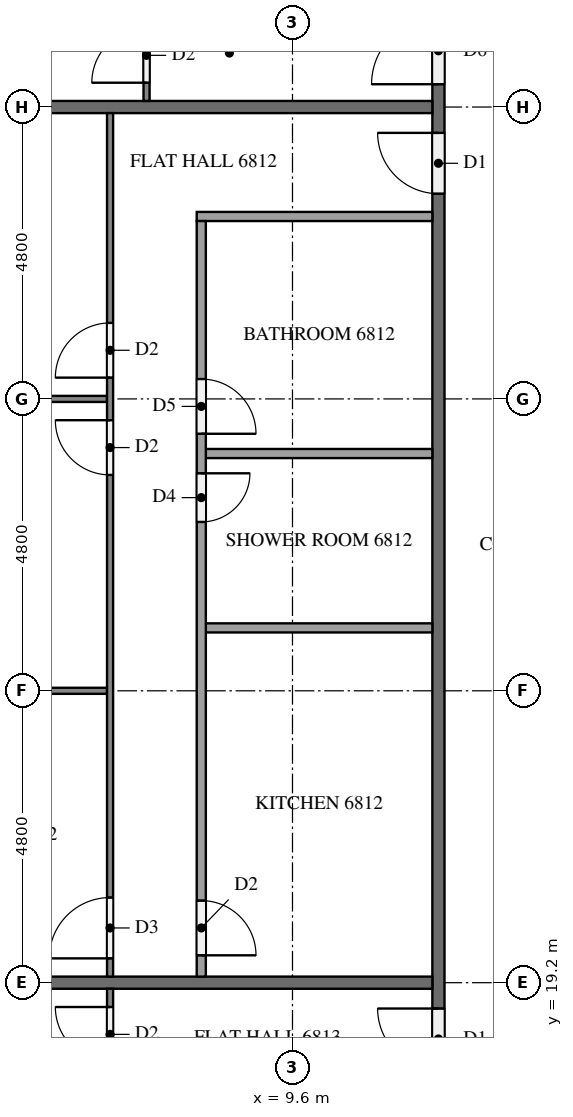
"""IFC4 building model, lengths in metres.
Left out: names, types, materials, properties, quantities, classifications, styles, units other than length and angle.
Written with IfcOpenShell. Run it as: python <this file> out.ifc"""

import sys

from ifc_helpers import new_model, si_unit, direction, frame, frame_2d, origin, place, context, subcontext, project, spatial, rectangle, extrude, element, fill, save


model = new_model("IFC4")
c1 = context("Model", 3, precision=1e-05, world=origin(), true_north=direction((0.0, 1.0)))
c2 = subcontext(c1, "Body", "Model", "MODEL_VIEW")
j1 = project(units=[si_unit("LENGTHUNIT", "METRE"), si_unit("PLANEANGLEUNIT", "RADIAN")], contexts=[c1])
p1 = place(None, origin())
s1 = spatial("IfcSite", under=j1, at=p1, CompositionType="ELEMENT")
p2 = place(p1, origin())
s2 = spatial("IfcBuilding", under=s1, at=p2, CompositionType="ELEMENT")
p3 = place(p2, frame((0.0, 0.0, 259.7)))
s3 = spatial("IfcBuildingStorey", under=s2, at=p3, CompositionType="ELEMENT", Elevation=259.7)
p4 = place(p3, frame((12.0, 12.1, 0.0), z_axis=(0.0, 0.0, 1.0), x_axis=(0.0, 1.0, 0.0)))
e1 = element("IfcWall", 1, at=p4, inside=s3, PredefinedType="PARTITIONING", context=c2, shape_type="SweptSolid", body=[
    extrude(rectangle(XDim=28.6, YDim=0.2, at=frame_2d((14.3, 0.0))), origin(), (0.0, 0.0, 1.0), 3.1),
])
p5 = place(p4, frame((21.875, 0.0, 0.0)))
e2 = element("IfcOpeningElement", 2, at=p5, cuts=e1, PredefinedType="OPENING", context=c2, shape_type="SweptSolid", body=[
    extrude(rectangle(XDim=1.1, YDim=2.1, at=frame_2d((0.55, 1.05))), frame((0.0, 0.11, 0.0), z_axis=(0.0, -1.0, 0.0), x_axis=(1.0, 0.0, 0.0)), (0.0, 0.0, 1.0), 0.22),
])
p6 = place(p4, frame((20.075, 0.0, 0.0)))
e3 = element("IfcOpeningElement", 3, at=p6, cuts=e1, PredefinedType="OPENING", context=c2, shape_type="SweptSolid", body=[
    extrude(rectangle(XDim=1.0, YDim=2.1, at=frame_2d((0.5, 1.05))), frame((0.0, 0.11, 0.0), z_axis=(0.0, -1.0, 0.0), x_axis=(1.0, 0.0, 0.0)), (0.0, 0.0, 1.0), 0.22),
])
p7 = place(p4, frame((5.675, 0.0, 0.0)))
e4 = element("IfcOpeningElement", 4, at=p7, cuts=e1, PredefinedType="OPENING", context=c2, shape_type="SweptSolid", body=[
    extrude(rectangle(XDim=1.0, YDim=2.1, at=frame_2d((0.5, 1.05))), frame((0.0, 0.11, 0.0), z_axis=(0.0, -1.0, 0.0), x_axis=(1.0, 0.0, 0.0)), (0.0, 0.0, 1.0), 0.22),
])
p8 = place(p3, frame((0.1, 33.6, 0.0), z_axis=(0.0, 0.0, 1.0), x_axis=(1.0, 0.0, 0.0)))
e5 = element("IfcWall", 5, at=p8, inside=s3, PredefinedType="PARTITIONING", context=c2, shape_type="SweptSolid", body=[
    extrude(rectangle(XDim=11.8, YDim=0.2, at=frame_2d((5.9, 0.0))), origin(), (0.0, 0.0, 1.0), 3.1),
])
p9 = place(p3, frame((0.275, 19.2, 0.0), z_axis=(0.0, 0.0, 1.0), x_axis=(1.0, 0.0, 0.0)))
e6 = element("IfcWall", 6, at=p9, inside=s3, PredefinedType="PARTITIONING", context=c2, shape_type="SweptSolid", body=[
    extrude(rectangle(XDim=11.625, YDim=0.2, at=frame_2d((5.812, 0.0))), origin(), (0.0, 0.0, 1.0), 3.1),
])
p10 = place(p3, frame((7.2, 33.7, 0.0), z_axis=(0.0, 0.0, 1.0), x_axis=(0.0, 1.0, 0.0)))
e7 = element("IfcWall", 7, at=p10, inside=s3, PredefinedType="PARTITIONING", context=c2, shape_type="SweptSolid", body=[
    extrude(rectangle(XDim=19.0, YDim=0.1, at=frame_2d((9.5, 0.0))), origin(), (0.0, 0.0, 1.0), 3.1),
])
p11 = place(p10, frame((0.3, 0.0, 0.0)))
e8 = element("IfcOpeningElement", 8, at=p11, cuts=e7, PredefinedType="OPENING", context=c2, shape_type="SweptSolid", body=[
    extrude(rectangle(XDim=0.9, YDim=2.1, at=frame_2d((0.45, 1.05))), frame((0.0, 0.06, 0.0), z_axis=(0.0, -1.0, 0.0), x_axis=(1.0, 0.0, 0.0)), (0.0, 0.0, 1.0), 0.12),
])
p12 = place(p10, frame((8.25, 0.0, 0.0)))
e9 = element("IfcOpeningElement", 9, at=p12, cuts=e7, PredefinedType="OPENING", context=c2, shape_type="SweptSolid", body=[
    extrude(rectangle(XDim=0.9, YDim=2.1, at=frame_2d((0.45, 1.05))), frame((0.0, 0.06, 0.0), z_axis=(0.0, -1.0, 0.0), x_axis=(1.0, 0.0, 0.0)), (0.0, 0.0, 1.0), 0.12),
])
p13 = place(p10, frame((9.85, 0.0, 0.0)))
e10 = element("IfcOpeningElement", 10, at=p13, cuts=e7, PredefinedType="OPENING", context=c2, shape_type="SweptSolid", body=[
    extrude(rectangle(XDim=1.0, YDim=2.1, at=frame_2d((0.5, 1.05))), frame((0.0, 0.06, 0.0), z_axis=(0.0, -1.0, 0.0), x_axis=(1.0, 0.0, 0.0)), (0.0, 0.0, 1.0), 0.12),
])
p14 = place(p10, frame((17.8, 0.0, 0.0)))
e11 = element("IfcOpeningElement", 11, at=p14, cuts=e7, PredefinedType="OPENING", context=c2, shape_type="SweptSolid", body=[
    extrude(rectangle(XDim=0.9, YDim=2.1, at=frame_2d((0.45, 1.05))), frame((0.0, 0.06, 0.0), z_axis=(0.0, -1.0, 0.0), x_axis=(1.0, 0.0, 0.0)), (0.0, 0.0, 1.0), 0.12),
])
p15 = place(p3, frame((6.55, 28.8, 0.0), z_axis=(0.0, 0.0, 1.0), x_axis=(-1.0, 0.0, 0.0)))
e12 = element("IfcWall", 12, at=p15, inside=s3, PredefinedType="PARTITIONING", context=c2, shape_type="SweptSolid", body=[
    extrude(rectangle(XDim=6.275, YDim=0.1, at=frame_2d((3.138, 0.0))), origin(), (0.0, 0.0, 1.0), 3.1),
])
p16 = place(p3, frame((6.55, 24.0, 0.0), z_axis=(0.0, 0.0, 1.0), x_axis=(-1.0, 0.0, 0.0)))
e13 = element("IfcWall", 13, at=p16, inside=s3, PredefinedType="PARTITIONING", context=c2, shape_type="SweptSolid", body=[
    extrude(rectangle(XDim=6.45, YDim=0.1, at=frame_2d((3.225, 0.0))), origin(), (0.0, 0.0, 1.0), 3.1),
])
p17 = place(p3, frame((6.6, 19.3, 0.0), z_axis=(0.0, 0.0, 1.0), x_axis=(0.0, 1.0, 0.0)))
e14 = element("IfcWall", 14, at=p17, inside=s3, PredefinedType="PARTITIONING", context=c2, shape_type="SweptSolid", body=[
    extrude(rectangle(XDim=14.2, YDim=0.1, at=frame_2d((7.1, 0.0))), origin(), (0.0, 0.0, 1.0), 3.1),
])
p18 = place(p17, frame((9.85, 0.0, 0.0)))
e15 = element("IfcOpeningElement", 15, at=p18, cuts=e14, PredefinedType="OPENING", context=c2, shape_type="SweptSolid", body=[
    extrude(rectangle(XDim=0.9, YDim=2.1, at=frame_2d((0.45, 1.05))), frame((0.0, 0.06, 0.0), z_axis=(0.0, -1.0, 0.0), x_axis=(1.0, 0.0, 0.0)), (0.0, 0.0, 1.0), 0.12),
])
p19 = place(p17, frame((8.25, 0.0, 0.0)))
e16 = element("IfcOpeningElement", 16, at=p19, cuts=e14, PredefinedType="OPENING", context=c2, shape_type="SweptSolid", body=[
    extrude(rectangle(XDim=0.9, YDim=2.1, at=frame_2d((0.45, 1.05))), frame((0.0, 0.06, 0.0), z_axis=(0.0, -1.0, 0.0), x_axis=(1.0, 0.0, 0.0)), (0.0, 0.0, 1.0), 0.12),
])
p20 = place(p17, frame((0.3, 0.0, 0.0)))
e17 = element("IfcOpeningElement", 17, at=p20, cuts=e14, PredefinedType="OPENING", context=c2, shape_type="SweptSolid", body=[
    extrude(rectangle(XDim=1.0, YDim=2.1, at=frame_2d((0.5, 1.05))), frame((0.0, 0.06, 0.0), z_axis=(0.0, -1.0, 0.0), x_axis=(1.0, 0.0, 0.0)), (0.0, 0.0, 1.0), 0.12),
])
for number, where, z_axis, x_axis in (
    (18, (11.9, 27.902, 0.0), (0.0, 0.0, 1.0), (-1.0, 0.0, 0.0)),
    (19, (11.9, 25.035, 0.0), (0.0, 0.0, 1.0), (-1.0, 0.0, 0.0)),
):
    element("IfcWall", number, at=place(p3, frame(where, z_axis=z_axis, x_axis=x_axis)), inside=s3, PredefinedType="PARTITIONING", context=c2, shape_type="SweptSolid", body=[
        extrude(rectangle(XDim=3.725, YDim=0.15, at=frame_2d((1.862, 0.0))), origin(), (0.0, 0.0, 1.0), 3.1),
    ])
p21 = place(p3, frame((11.9, 31.8, 0.0), z_axis=(0.0, 0.0, 1.0), x_axis=(-1.0, 0.0, 0.0)))
e20 = element("IfcWall", 20, at=p21, inside=s3, PredefinedType="PARTITIONING", context=c2, shape_type="SweptSolid", body=[
    extrude(rectangle(XDim=3.875, YDim=0.15, at=frame_2d((1.938, 0.0))), origin(), (0.0, 0.0, 1.0), 3.1),
])
p22 = place(p3, frame((8.1, 31.725, 0.0), z_axis=(0.0, 0.0, 1.0), x_axis=(0.0, -1.0, 0.0)))
e21 = element("IfcWall", 21, at=p22, inside=s3, PredefinedType="PARTITIONING", context=c2, shape_type="SweptSolid", body=[
    extrude(rectangle(XDim=12.425, YDim=0.15, at=frame_2d((6.212, 0.0))), origin(), (0.0, 0.0, 1.0), 3.1),
])
p23 = place(p22, frame((2.598, 0.0, 0.0)))
e22 = element("IfcOpeningElement", 22, at=p23, cuts=e21, PredefinedType="OPENING", context=c2, shape_type="SweptSolid", body=[
    extrude(rectangle(XDim=0.9, YDim=2.1, at=frame_2d((0.45, 1.05))), frame((0.0, 0.085, 0.0), z_axis=(0.0, -1.0, 0.0), x_axis=(1.0, 0.0, 0.0)), (0.0, 0.0, 1.0), 0.17),
])
p24 = place(p22, frame((4.148, 0.0, 0.0)))
e23 = element("IfcOpeningElement", 23, at=p24, cuts=e21, PredefinedType="OPENING", context=c2, shape_type="SweptSolid", body=[
    extrude(rectangle(XDim=0.8, YDim=2.1, at=frame_2d((0.4, 1.05))), frame((0.0, 0.085, 0.0), z_axis=(0.0, -1.0, 0.0), x_axis=(1.0, 0.0, 0.0)), (0.0, 0.0, 1.0), 0.17),
])
p25 = place(p22, frame((11.175, 0.0, 0.0)))
e24 = element("IfcOpeningElement", 24, at=p25, cuts=e21, PredefinedType="OPENING", context=c2, shape_type="SweptSolid", body=[
    extrude(rectangle(XDim=0.9, YDim=2.1, at=frame_2d((0.45, 1.05))), frame((0.0, 0.085, 0.0), z_axis=(0.0, -1.0, 0.0), x_axis=(1.0, 0.0, 0.0)), (0.0, 0.0, 1.0), 0.17),
])
p26 = place(p3, frame((6.6, 4.9, 0.0), z_axis=(0.0, 0.0, 1.0), x_axis=(0.0, 1.0, 0.0)))
e25 = element("IfcWall", 25, at=p26, inside=s3, PredefinedType="PARTITIONING", context=c2, shape_type="SweptSolid", body=[
    extrude(rectangle(XDim=14.2, YDim=0.1, at=frame_2d((7.1, 0.0))), origin(), (0.0, 0.0, 1.0), 3.1),
])
p27 = place(p26, frame((13.0, 0.0, 0.0)))
e26 = element("IfcOpeningElement", 26, at=p27, cuts=e25, PredefinedType="OPENING", context=c2, shape_type="SweptSolid", body=[
    extrude(rectangle(XDim=0.9, YDim=2.1, at=frame_2d((0.45, 1.05))), frame((0.0, 0.06, 0.0), z_axis=(0.0, -1.0, 0.0), x_axis=(1.0, 0.0, 0.0)), (0.0, 0.0, 1.0), 0.12),
])
p28 = place(p26, frame((5.05, 0.0, 0.0)))
e27 = element("IfcOpeningElement", 27, at=p28, cuts=e25, PredefinedType="OPENING", context=c2, shape_type="SweptSolid", body=[
    extrude(rectangle(XDim=1.0, YDim=2.1, at=frame_2d((0.5, 1.05))), frame((0.0, 0.06, 0.0), z_axis=(0.0, -1.0, 0.0), x_axis=(1.0, 0.0, 0.0)), (0.0, 0.0, 1.0), 0.12),
])
p29 = place(p26, frame((3.45, 0.0, 0.0)))
e28 = element("IfcOpeningElement", 28, at=p29, cuts=e25, PredefinedType="OPENING", context=c2, shape_type="SweptSolid", body=[
    extrude(rectangle(XDim=0.9, YDim=2.1, at=frame_2d((0.45, 1.05))), frame((0.0, 0.06, 0.0), z_axis=(0.0, -1.0, 0.0), x_axis=(1.0, 0.0, 0.0)), (0.0, 0.0, 1.0), 0.12),
])
p30 = place(p5, origin())
e29 = element("IfcDoor", 29, at=p30, inside=s3, OperationType="SINGLE_SWING_LEFT", PredefinedType="DOOR", context=c2, shape_type="SweptSolid", body=[
    extrude(rectangle(XDim=1.1, YDim=2.1, at=frame_2d((0.55, 1.05))), frame((0.0, 0.025, 0.0), z_axis=(0.0, -1.0, 0.0), x_axis=(1.0, 0.0, 0.0)), (0.0, 0.0, 1.0), 0.05),
])
fill(e2, e29)
p31 = place(p6, origin())
e30 = element("IfcDoor", 30, at=p31, inside=s3, OperationType="SINGLE_SWING_RIGHT", PredefinedType="DOOR", context=c2, shape_type="SweptSolid", body=[
    extrude(rectangle(XDim=1.0, YDim=2.1, at=frame_2d((0.5, 1.05))), frame((0.0, 0.025, 0.0), z_axis=(0.0, -1.0, 0.0), x_axis=(1.0, 0.0, 0.0)), (0.0, 0.0, 1.0), 0.05),
])
fill(e3, e30)
p32 = place(p7, origin())
e31 = element("IfcDoor", 31, at=p32, inside=s3, OperationType="SINGLE_SWING_RIGHT", PredefinedType="DOOR", context=c2, shape_type="SweptSolid", body=[
    extrude(rectangle(XDim=1.0, YDim=2.1, at=frame_2d((0.5, 1.05))), frame((0.0, 0.025, 0.0), z_axis=(0.0, -1.0, 0.0), x_axis=(1.0, 0.0, 0.0)), (0.0, 0.0, 1.0), 0.05),
])
fill(e4, e31)
p33 = place(p11, origin())
e32 = element("IfcDoor", 32, at=p33, inside=s3, OperationType="SINGLE_SWING_LEFT", PredefinedType="DOOR", context=c2, shape_type="SweptSolid", body=[
    extrude(rectangle(XDim=0.9, YDim=2.1, at=frame_2d((0.45, 1.05))), frame((0.0, 0.025, 0.0), z_axis=(0.0, -1.0, 0.0), x_axis=(1.0, 0.0, 0.0)), (0.0, 0.0, 1.0), 0.05),
])
fill(e8, e32)
p34 = place(p18, origin())
e33 = element("IfcDoor", 33, at=p34, inside=s3, OperationType="SINGLE_SWING_LEFT", PredefinedType="DOOR", context=c2, shape_type="SweptSolid", body=[
    extrude(rectangle(XDim=0.9, YDim=2.1, at=frame_2d((0.45, 1.05))), frame((0.0, 0.025, 0.0), z_axis=(0.0, -1.0, 0.0), x_axis=(1.0, 0.0, 0.0)), (0.0, 0.0, 1.0), 0.05),
])
fill(e15, e33)
p35 = place(p19, origin())
e34 = element("IfcDoor", 34, at=p35, inside=s3, OperationType="SINGLE_SWING_RIGHT", PredefinedType="DOOR", context=c2, shape_type="SweptSolid", body=[
    extrude(rectangle(XDim=0.9, YDim=2.1, at=frame_2d((0.45, 1.05))), frame((0.0, 0.025, 0.0), z_axis=(0.0, -1.0, 0.0), x_axis=(1.0, 0.0, 0.0)), (0.0, 0.0, 1.0), 0.05),
])
fill(e16, e34)
p36 = place(p20, origin())
e35 = element("IfcDoor", 35, at=p36, inside=s3, OperationType="SINGLE_SWING_LEFT", PredefinedType="DOOR", context=c2, shape_type="SweptSolid", body=[
    extrude(rectangle(XDim=1.0, YDim=2.1, at=frame_2d((0.5, 1.05))), frame((0.0, 0.025, 0.0), z_axis=(0.0, -1.0, 0.0), x_axis=(1.0, 0.0, 0.0)), (0.0, 0.0, 1.0), 0.05),
])
fill(e17, e35)
p37 = place(p23, origin())
e36 = element("IfcDoor", 36, at=p37, inside=s3, OperationType="SINGLE_SWING_RIGHT", PredefinedType="DOOR", context=c2, shape_type="SweptSolid", body=[
    extrude(rectangle(XDim=0.9, YDim=2.1, at=frame_2d((0.45, 1.05))), frame((0.0, 0.025, 0.0), z_axis=(0.0, -1.0, 0.0), x_axis=(1.0, 0.0, 0.0)), (0.0, 0.0, 1.0), 0.05),
])
fill(e22, e36)
p38 = place(p24, origin())
e37 = element("IfcDoor", 37, at=p38, inside=s3, OperationType="SINGLE_SWING_LEFT", PredefinedType="DOOR", context=c2, shape_type="SweptSolid", body=[
    extrude(rectangle(XDim=0.8, YDim=2.1, at=frame_2d((0.4, 1.05))), frame((0.0, 0.025, 0.0), z_axis=(0.0, -1.0, 0.0), x_axis=(1.0, 0.0, 0.0)), (0.0, 0.0, 1.0), 0.05),
])
fill(e23, e37)
p39 = place(p25, origin())
e38 = element("IfcDoor", 38, at=p39, inside=s3, OperationType="SINGLE_SWING_RIGHT", PredefinedType="DOOR", context=c2, shape_type="SweptSolid", body=[
    extrude(rectangle(XDim=0.9, YDim=2.1, at=frame_2d((0.45, 1.05))), frame((0.0, 0.025, 0.0), z_axis=(0.0, -1.0, 0.0), x_axis=(1.0, 0.0, 0.0)), (0.0, 0.0, 1.0), 0.05),
])
fill(e24, e38)
p40 = place(p27, origin())
e39 = element("IfcDoor", 39, at=p40, inside=s3, OperationType="SINGLE_SWING_RIGHT", PredefinedType="DOOR", context=c2, shape_type="SweptSolid", body=[
    extrude(rectangle(XDim=0.9, YDim=2.1, at=frame_2d((0.45, 1.05))), frame((0.0, 0.025, 0.0), z_axis=(0.0, -1.0, 0.0), x_axis=(1.0, 0.0, 0.0)), (0.0, 0.0, 1.0), 0.05),
])
fill(e26, e39)
save(model, sys.argv[1])
